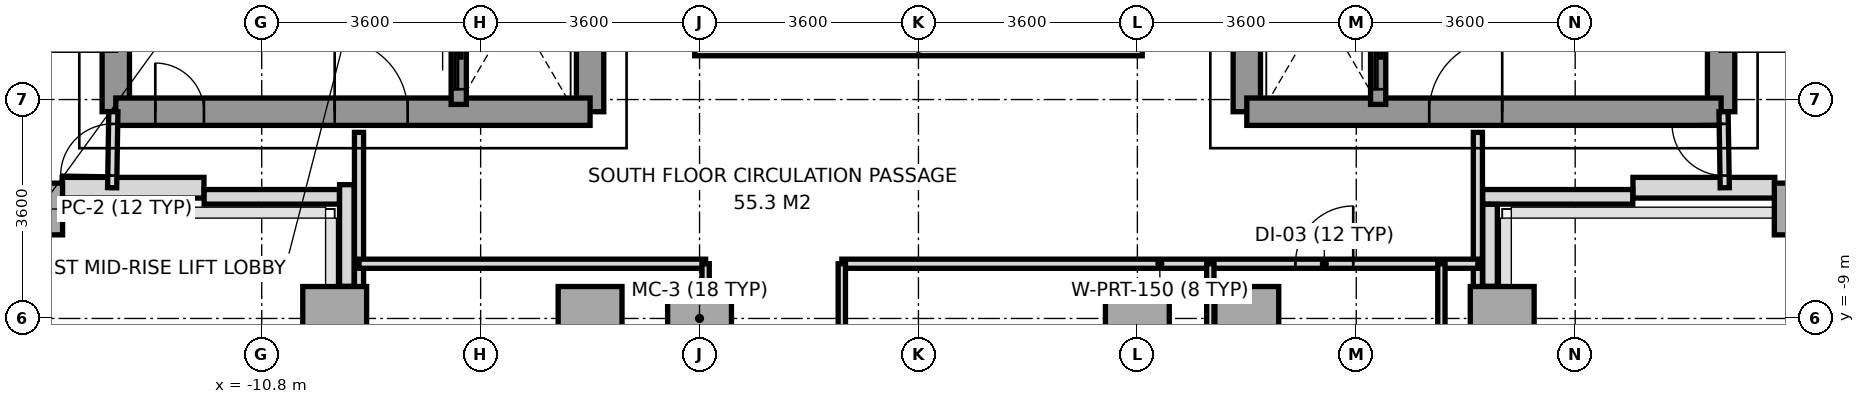
"""IFC4 building model, lengths in metres.
Left out: names, types, materials, properties, quantities, classifications, styles, units other than length and angle.
Written with IfcOpenShell. Run it as: python <this file> out.ifc"""

import sys

from ifc_helpers import new_model, si_unit, direction, frame, frame_2d, origin, origin_2d, place, context, subcontext, project, spatial, rectangle, extrude, source, transform, mapped, element, fill, save


model = new_model("IFC4")
c1 = context("Model", 3, precision=1e-05, world=origin(), true_north=direction((0.0, 1.0)))
c2 = subcontext(c1, "Body", "Model", "MODEL_VIEW")
j1 = project(units=[si_unit("LENGTHUNIT", "METRE"), si_unit("PLANEANGLEUNIT", "RADIAN")], contexts=[c1])
p1 = place(None, origin())
s1 = spatial("IfcSite", under=j1, at=p1, CompositionType="ELEMENT")
p2 = place(p1, origin())
s2 = spatial("IfcBuilding", under=s1, at=p2, CompositionType="ELEMENT")
p3 = place(p2, frame((0.0, 0.0, 107.4)))
s3 = spatial("IfcBuildingStorey", under=s2, at=p3, CompositionType="ELEMENT", Elevation=107.4)
m1 = source(origin(), c2, "Body", "SweptSolid", [
    extrude(rectangle(XDim=0.65, YDim=0.85, at=origin_2d()), origin(), (0.0, 0.0, 1.0), 3.2),
])
p4 = place(p3, frame((-14.4, -7.2, 0.0), z_axis=(0.0, 0.0, 1.0), x_axis=(1.0, 0.0, 0.0)))
e1 = element("IfcColumn", 1, at=p4, inside=s3, PredefinedType="COLUMN", context=c2, shape_type="MappedRepresentation", body=[
    mapped(m1, transform((0.0, 0.0, 0.0), x_axis=(1.0, 0.0, 0.0), y_axis=(0.0, 1.0, 0.0), z_axis=(0.0, 0.0, 1.0), scale=1.0)),
])
m2 = source(origin(), c2, "Body", "SweptSolid", [
    extrude(rectangle(XDim=1.05, YDim=1.05, at=origin_2d()), origin(), (0.0, 0.0, 1.0), 3.2),
])
for number, where, z_axis, x_axis in (
    (2, (-9.6, -9.0, 0.0), (0.0, 0.0, 1.0), (1.0, 0.0, 0.0)),
    (3, (-5.4, -9.0, 0.0), (0.0, 0.0, 1.0), (1.0, 0.0, 0.0)),
    (4, (-3.6, -9.0, 0.0), (0.0, 0.0, 1.0), (1.0, 0.0, 0.0)),
    (5, (3.6, -9.0, 0.0), (0.0, 0.0, 1.0), (1.0, 0.0, 0.0)),
    (6, (5.4, -9.0, 0.0), (0.0, 0.0, 1.0), (1.0, 0.0, 0.0)),
    (7, (9.6, -9.0, 0.0), (0.0, 0.0, 1.0), (1.0, 0.0, 0.0)),
):
    element("IfcColumn", number, at=place(p3, frame(where, z_axis=z_axis, x_axis=x_axis)), inside=s3, PredefinedType="COLUMN", context=c2, shape_type="MappedRepresentation", body=[
        mapped(m2, transform((0.0, 0.0, 0.0), x_axis=(1.0, 0.0, 0.0), y_axis=(0.0, 1.0, 0.0), z_axis=(0.0, 0.0, 1.0), scale=1.0)),
    ])
p5 = place(p3, frame((14.4, -7.2, 0.0), z_axis=(0.0, 0.0, 1.0), x_axis=(1.0, 0.0, 0.0)))
e8 = element("IfcColumn", 8, at=p5, inside=s3, PredefinedType="COLUMN", context=c2, shape_type="MappedRepresentation", body=[
    mapped(m1, transform((0.0, 0.0, 0.0), x_axis=(1.0, 0.0, 0.0), y_axis=(0.0, 1.0, 0.0), z_axis=(0.0, 0.0, 1.0), scale=1.0)),
])
for number, where, z_axis, x_axis in (
    (9, (-14.083, -6.85, 0.0), (0.0, 0.0, 1.0), (1.0, 0.0, 0.0)),
    (10, (11.75, -6.85, 0.0), (0.0, 0.0, 1.0), (1.0, 0.0, 0.0)),
):
    element("IfcWall", number, at=place(p3, frame(where, z_axis=z_axis, x_axis=x_axis)), inside=s3, PredefinedType="SOLIDWALL", context=c2, shape_type="SweptSolid", body=[
        extrude(rectangle(XDim=2.333, YDim=0.34, at=frame_2d((1.167, 0.0))), origin(), (0.0, 0.0, 1.0), 3.2),
    ])
p6 = place(p3, frame((11.747, -7.0, 0.0), z_axis=(0.0, 0.0, 1.0), x_axis=(-1.0, 0.0, 0.0)))
e11 = element("IfcWall", 11, at=p6, inside=s3, PredefinedType="PARAPET", context=c2, shape_type="SweptSolid", body=[
    extrude(rectangle(XDim=2.469, YDim=0.24, at=frame_2d((1.234, 0.0))), origin(), (0.0, 0.0, 1.0), 1.15),
])
p7 = place(p3, frame((9.4, -7.123, 0.0), z_axis=(0.0, 0.0, 1.0), x_axis=(0.0, -1.0, 0.0)))
e12 = element("IfcWall", 12, at=p7, inside=s3, PredefinedType="PARAPET", context=c2, shape_type="SweptSolid", body=[
    extrude(rectangle(XDim=1.349, YDim=0.24, at=frame_2d((0.674, 0.0))), origin(), (0.0, 0.0, 1.0), 1.15),
])
p8 = place(p3, frame((-9.4, -8.472, 0.0), z_axis=(0.0, 0.0, 1.0), x_axis=(0.0, 1.0, 0.0)))
e13 = element("IfcWall", 13, at=p8, inside=s3, PredefinedType="PARAPET", context=c2, shape_type="SweptSolid", body=[
    extrude(rectangle(XDim=1.672, YDim=0.24, at=frame_2d((0.836, 0.0))), origin(), (0.0, 0.0, 1.0), 1.15),
])
p9 = place(p3, frame((-9.523, -7.0, 0.0), z_axis=(0.0, 0.0, 1.0), x_axis=(-1.0, 0.0, 0.0)))
e14 = element("IfcWall", 14, at=p9, inside=s3, PredefinedType="PARAPET", context=c2, shape_type="SweptSolid", body=[
    extrude(rectangle(XDim=2.224, YDim=0.24, at=frame_2d((1.112, 0.0))), origin(), (0.0, 0.0, 1.0), 1.15),
])
p10 = place(p3, frame((-13.2, -5.6, 0.0), z_axis=(0.0, 0.0, 1.0), x_axis=(0.0, 1.0, 0.0)))
e15 = element("IfcWall", 15, at=p10, inside=s3, PredefinedType="SHEAR", context=c2, shape_type="SweptSolid", body=[
    extrude(rectangle(XDim=11.2, YDim=0.45, at=frame_2d((5.6, 0.0))), origin(), (0.0, 0.0, 1.0), 3.2),
])
p11 = place(p3, frame((-5.4, -5.6, 0.0), z_axis=(0.0, 0.0, 1.0), x_axis=(0.0, 1.0, 0.0)))
e16 = element("IfcWall", 16, at=p11, inside=s3, PredefinedType="SHEAR", context=c2, shape_type="SweptSolid", body=[
    extrude(rectangle(XDim=12.5, YDim=0.45, at=frame_2d((6.25, 0.0))), origin(), (0.0, 0.0, 1.0), 3.2),
])
p12 = place(p11, frame((4.55, 0.0, 0.0)))
e17 = element("IfcOpeningElement", 17, at=p12, cuts=e16, PredefinedType="OPENING", context=c2, shape_type="SweptSolid", body=[
    extrude(rectangle(XDim=1.2, YDim=2.2, at=frame_2d((0.6, 1.1))), frame((0.0, 0.235, 0.0), z_axis=(0.0, -1.0, 0.0), x_axis=(1.0, 0.0, 0.0)), (0.0, 0.0, 1.0), 0.47),
])
p13 = place(p11, frame((6.86, 0.0, 0.0)))
e18 = element("IfcOpeningElement", 18, at=p13, cuts=e16, PredefinedType="OPENING", context=c2, shape_type="SweptSolid", body=[
    extrude(rectangle(XDim=0.8, YDim=2.1, at=frame_2d((0.4, 1.05))), frame((0.0, 0.235, 0.0), z_axis=(0.0, -1.0, 0.0), x_axis=(1.0, 0.0, 0.0)), (0.0, 0.0, 1.0), 0.47),
])
p14 = place(p3, frame((-13.2, -5.6, 0.0), z_axis=(0.0, 0.0, 1.0), x_axis=(1.0, 0.0, 0.0)))
e19 = element("IfcWall", 19, at=p14, inside=s3, PredefinedType="SHEAR", context=c2, shape_type="SweptSolid", body=[
    extrude(rectangle(XDim=7.8, YDim=0.45, at=frame_2d((3.9, 0.0))), origin(), (0.0, 0.0, 1.0), 3.2),
])
p15 = place(p14, frame((3.6, 0.0, 0.0)))
e20 = element("IfcOpeningElement", 20, at=p15, cuts=e19, PredefinedType="OPENING", context=c2, shape_type="SweptSolid", body=[
    extrude(rectangle(XDim=1.2, YDim=2.2, at=frame_2d((0.6, 1.1))), frame((0.0, 0.235, 0.0), z_axis=(0.0, -1.0, 0.0), x_axis=(1.0, 0.0, 0.0)), (0.0, 0.0, 1.0), 0.47),
])
p16 = place(p14, frame((0.65, 0.0, 0.0)))
e21 = element("IfcOpeningElement", 21, at=p16, cuts=e19, PredefinedType="OPENING", context=c2, shape_type="SweptSolid", body=[
    extrude(rectangle(XDim=0.8, YDim=2.1, at=frame_2d((0.4, 1.05))), frame((0.0, 0.235, 0.0), z_axis=(0.0, -1.0, 0.0), x_axis=(1.0, 0.0, 0.0)), (0.0, 0.0, 1.0), 0.47),
])
p17 = place(p3, frame((13.2, -5.6, 0.0), z_axis=(0.0, 0.0, 1.0), x_axis=(0.0, 1.0, 0.0)))
e22 = element("IfcWall", 22, at=p17, inside=s3, PredefinedType="SHEAR", context=c2, shape_type="SweptSolid", body=[
    extrude(rectangle(XDim=11.2, YDim=0.45, at=frame_2d((5.6, 0.0))), origin(), (0.0, 0.0, 1.0), 3.2),
])
p18 = place(p3, frame((5.4, -5.6, 0.0), z_axis=(0.0, 0.0, 1.0), x_axis=(0.0, 1.0, 0.0)))
e23 = element("IfcWall", 23, at=p18, inside=s3, PredefinedType="SHEAR", context=c2, shape_type="SweptSolid", body=[
    extrude(rectangle(XDim=12.5, YDim=0.45, at=frame_2d((6.25, 0.0))), origin(), (0.0, 0.0, 1.0), 3.2),
])
p19 = place(p18, frame((4.55, 0.0, 0.0)))
e24 = element("IfcOpeningElement", 24, at=p19, cuts=e23, PredefinedType="OPENING", context=c2, shape_type="SweptSolid", body=[
    extrude(rectangle(XDim=1.2, YDim=2.2, at=frame_2d((0.6, 1.1))), frame((0.0, 0.235, 0.0), z_axis=(0.0, -1.0, 0.0), x_axis=(1.0, 0.0, 0.0)), (0.0, 0.0, 1.0), 0.47),
])
p20 = place(p18, frame((6.86, 0.0, 0.0)))
e25 = element("IfcOpeningElement", 25, at=p20, cuts=e23, PredefinedType="OPENING", context=c2, shape_type="SweptSolid", body=[
    extrude(rectangle(XDim=0.8, YDim=2.1, at=frame_2d((0.4, 1.05))), frame((0.0, 0.235, 0.0), z_axis=(0.0, -1.0, 0.0), x_axis=(1.0, 0.0, 0.0)), (0.0, 0.0, 1.0), 0.47),
])
p21 = place(p3, frame((5.4, -5.6, 0.0), z_axis=(0.0, 0.0, 1.0), x_axis=(1.0, 0.0, 0.0)))
e26 = element("IfcWall", 26, at=p21, inside=s3, PredefinedType="SHEAR", context=c2, shape_type="SweptSolid", body=[
    extrude(rectangle(XDim=7.8, YDim=0.45, at=frame_2d((3.9, 0.0))), origin(), (0.0, 0.0, 1.0), 3.2),
])
p22 = place(p21, frame((3.0, 0.0, 0.0)))
e27 = element("IfcOpeningElement", 27, at=p22, cuts=e26, PredefinedType="OPENING", context=c2, shape_type="SweptSolid", body=[
    extrude(rectangle(XDim=1.2, YDim=2.2, at=frame_2d((0.6, 1.1))), frame((0.0, 0.235, 0.0), z_axis=(0.0, -1.0, 0.0), x_axis=(1.0, 0.0, 0.0)), (0.0, 0.0, 1.0), 0.47),
])
p23 = place(p3, frame((-7.56, -5.48, 0.0), z_axis=(0.0, 0.0, 1.0), x_axis=(0.0, 1.0, 0.0)))
e28 = element("IfcWall", 28, at=p23, inside=s3, PredefinedType="SOLIDWALL", context=c2, shape_type="SweptSolid", body=[
    extrude(rectangle(XDim=1.6, YDim=0.25, at=frame_2d((0.8, 0.0))), origin(), (0.0, 0.0, 1.0), 3.2),
])
p24 = place(p23, frame((0.25, 0.0, 0.0)))
e29 = element("IfcOpeningElement", 29, at=p24, cuts=e28, PredefinedType="OPENING", context=c2, shape_type="SweptSolid", body=[
    extrude(rectangle(XDim=1.1, YDim=2.2, at=frame_2d((0.55, 1.1))), frame((0.0, 0.135, 0.0), z_axis=(0.0, -1.0, 0.0), x_axis=(1.0, 0.0, 0.0)), (0.0, 0.0, 1.0), 0.27),
])
p25 = place(p3, frame((7.56, -5.48, 0.0), z_axis=(0.0, 0.0, 1.0), x_axis=(0.0, 1.0, 0.0)))
e30 = element("IfcWall", 30, at=p25, inside=s3, PredefinedType="SOLIDWALL", context=c2, shape_type="SweptSolid", body=[
    extrude(rectangle(XDim=1.6, YDim=0.25, at=frame_2d((0.8, 0.0))), origin(), (0.0, 0.0, 1.0), 3.2),
])
p26 = place(p25, frame((0.25, 0.0, 0.0)))
e31 = element("IfcOpeningElement", 31, at=p26, cuts=e30, PredefinedType="OPENING", context=c2, shape_type="SweptSolid", body=[
    extrude(rectangle(XDim=1.1, YDim=2.2, at=frame_2d((0.55, 1.1))), frame((0.0, 0.135, 0.0), z_axis=(0.0, -1.0, 0.0), x_axis=(1.0, 0.0, 0.0)), (0.0, 0.0, 1.0), 0.27),
])
for number, where, z_axis, x_axis in (
    (32, (-9.2, -15.68, 0.0), (0.0, 0.0, 1.0), (0.0, 1.0, 0.0)),
    (33, (9.2, -15.68, 0.0), (0.0, 0.0, 1.0), (0.0, 1.0, 0.0)),
):
    element("IfcWall", number, at=place(p3, frame(where, z_axis=z_axis, x_axis=x_axis)), inside=s3, PredefinedType="PARTITIONING", context=c2, shape_type="SweptSolid", body=[
        extrude(rectangle(XDim=9.74, YDim=0.15, at=frame_2d((4.87, 0.0))), origin(), (0.0, 0.0, 1.0), 2.7),
    ])
p27 = place(p3, frame((-9.2, -8.1, 0.0), z_axis=(0.0, 0.0, 1.0), x_axis=(1.0, 0.0, 0.0)))
e34 = element("IfcWall", 34, at=p27, inside=s3, PredefinedType="PARTITIONING", context=c2, shape_type="SweptSolid", body=[
    extrude(rectangle(XDim=5.7, YDim=0.15, at=frame_2d((2.85, 0.0))), origin(), (0.0, 0.0, 1.0), 2.75),
])
p28 = place(p3, frame((-1.26, -8.1, 0.0), z_axis=(0.0, 0.0, 1.0), x_axis=(1.0, 0.0, 0.0)))
e35 = element("IfcWall", 35, at=p28, inside=s3, PredefinedType="PARTITIONING", context=c2, shape_type="SweptSolid", body=[
    extrude(rectangle(XDim=10.46, YDim=0.15, at=frame_2d((5.23, 0.0))), origin(), (0.0, 0.0, 1.0), 2.75),
])
p29 = place(p28, frame((7.46, 0.0, 0.0)))
e36 = element("IfcOpeningElement", 36, at=p29, cuts=e35, PredefinedType="OPENING", context=c2, shape_type="SweptSolid", body=[
    extrude(rectangle(XDim=0.95, YDim=2.15, at=frame_2d((0.475, 1.075))), frame((0.0, 0.085, 0.0), z_axis=(0.0, -1.0, 0.0), x_axis=(1.0, 0.0, 0.0)), (0.0, 0.0, 1.0), 0.17),
])
p30 = place(p3, frame((-3.5, -18.1, 0.0), z_axis=(0.0, 0.0, 1.0), x_axis=(0.0, 1.0, 0.0)))
e37 = element("IfcWall", 37, at=p30, inside=s3, PredefinedType="PARTITIONING", context=c2, shape_type="SweptSolid", body=[
    extrude(rectangle(XDim=10.0, YDim=0.12, at=frame_2d((5.0, 0.0))), origin(), (0.0, 0.0, 1.0), 2.7),
])
p31 = place(p30, frame((5.9, 0.0, 0.0)))
e38 = element("IfcOpeningElement", 38, at=p31, cuts=e37, PredefinedType="OPENING", context=c2, shape_type="SweptSolid", body=[
    extrude(rectangle(XDim=0.95, YDim=2.15, at=frame_2d((0.475, 1.075))), frame((0.0, 0.07, 0.0), z_axis=(0.0, -1.0, 0.0), x_axis=(1.0, 0.0, 0.0)), (0.0, 0.0, 1.0), 0.14),
])
p32 = place(p30, frame((1.2, 0.0, 0.0)))
e39 = element("IfcOpeningElement", 39, at=p32, cuts=e37, PredefinedType="OPENING", context=c2, shape_type="SweptSolid", body=[
    extrude(rectangle(XDim=0.95, YDim=2.15, at=frame_2d((0.475, 1.075))), frame((0.0, 0.07, 0.0), z_axis=(0.0, -1.0, 0.0), x_axis=(1.0, 0.0, 0.0)), (0.0, 0.0, 1.0), 0.14),
])
p33 = place(p3, frame((-1.26, -18.1, 0.0), z_axis=(0.0, 0.0, 1.0), x_axis=(0.0, 1.0, 0.0)))
e40 = element("IfcWall", 40, at=p33, inside=s3, PredefinedType="PARTITIONING", context=c2, shape_type="SweptSolid", body=[
    extrude(rectangle(XDim=10.0, YDim=0.12, at=frame_2d((5.0, 0.0))), origin(), (0.0, 0.0, 1.0), 2.7),
])
p34 = place(p33, frame((1.6, 0.0, 0.0)))
e41 = element("IfcOpeningElement", 41, at=p34, cuts=e40, PredefinedType="OPENING", context=c2, shape_type="SweptSolid", body=[
    extrude(rectangle(XDim=1.1, YDim=2.2, at=frame_2d((0.55, 1.1))), frame((0.0, 0.07, 0.0), z_axis=(0.0, -1.0, 0.0), x_axis=(1.0, 0.0, 0.0)), (0.0, 0.0, 1.0), 0.14),
])
p35 = place(p3, frame((4.8, -11.5, 0.0), z_axis=(0.0, 0.0, 1.0), x_axis=(0.0, 1.0, 0.0)))
e42 = element("IfcWall", 42, at=p35, inside=s3, PredefinedType="PARTITIONING", context=c2, shape_type="SweptSolid", body=[
    extrude(rectangle(XDim=3.4, YDim=0.12, at=frame_2d((1.7, 0.0))), origin(), (0.0, 0.0, 1.0), 3.2),
])
p36 = place(p3, frame((8.6, -11.5, 0.0), z_axis=(0.0, 0.0, 1.0), x_axis=(0.0, 1.0, 0.0)))
e43 = element("IfcWall", 43, at=p36, inside=s3, PredefinedType="PARTITIONING", context=c2, shape_type="SweptSolid", body=[
    extrude(rectangle(XDim=3.4, YDim=0.12, at=frame_2d((1.7, 0.0))), origin(), (0.0, 0.0, 1.0), 2.7),
])
p37 = place(p3, frame((-13.26, -6.85, 0.0), z_axis=(0.0, 0.0, 1.0), x_axis=(0.016013571389, 0.999871774545, 0.0)))
e44 = element("IfcWall", 44, at=p37, inside=s3, PredefinedType="PARTITIONING", context=c2, shape_type="SweptSolid", body=[
    extrude(rectangle(XDim=1.25, YDim=0.15, at=frame_2d((0.625, 0.0))), origin(), (0.0, 0.0, 1.0), 3.2),
])
p38 = place(p37, frame((0.2, 0.0, 0.0)))
e45 = element("IfcOpeningElement", 45, at=p38, cuts=e44, PredefinedType="OPENING", context=c2, shape_type="SweptSolid", body=[
    extrude(rectangle(XDim=0.85, YDim=2.1, at=frame_2d((0.425, 1.05))), frame((0.0, 0.085, 0.0), z_axis=(0.0, -1.0, 0.0), x_axis=(1.0, 0.0, 0.0)), (0.0, 0.0, 1.0), 0.17),
])
p39 = place(p3, frame((13.26, -6.85, 0.0), z_axis=(0.0, 0.0, 1.0), x_axis=(-0.016013571389, 0.999871774545, 0.0)))
e46 = element("IfcWall", 46, at=p39, inside=s3, PredefinedType="PARTITIONING", context=c2, shape_type="SweptSolid", body=[
    extrude(rectangle(XDim=1.25, YDim=0.15, at=frame_2d((0.625, 0.0))), origin(), (0.0, 0.0, 1.0), 3.2),
])
p40 = place(p39, frame((0.2, 0.0, 0.0)))
e47 = element("IfcOpeningElement", 47, at=p40, cuts=e46, PredefinedType="OPENING", context=c2, shape_type="SweptSolid", body=[
    extrude(rectangle(XDim=0.85, YDim=2.1, at=frame_2d((0.425, 1.05))), frame((0.0, 0.085, 0.0), z_axis=(0.0, -1.0, 0.0), x_axis=(1.0, 0.0, 0.0)), (0.0, 0.0, 1.0), 0.17),
])
p41 = place(p3, frame((-3.68, -4.56, 0.0), z_axis=(0.0, 0.0, 1.0), x_axis=(1.0, 0.0, 0.0)))
e48 = element("IfcWall", 48, at=p41, inside=s3, PredefinedType="PARAPET", context=c2, shape_type="SweptSolid", body=[
    extrude(rectangle(XDim=7.36, YDim=0.24, at=frame_2d((3.68, 0.0))), origin(), (0.0, 0.0, 1.0), 1.15),
])
m3 = source(origin(), c2, "Body", "SweptSolid", [
    extrude(rectangle(XDim=1.2, YDim=2.2, at=frame_2d((0.6, 1.1))), frame((0.0, 0.025, 0.0), z_axis=(0.0, -1.0, 0.0), x_axis=(1.0, 0.0, 0.0)), (0.0, 0.0, 1.0), 0.05),
])
p42 = place(p15, origin())
e49 = element("IfcDoor", 49, at=p42, inside=s3, OperationType="SINGLE_SWING_LEFT", PredefinedType="DOOR", context=c2, shape_type="MappedRepresentation", body=[
    mapped(m3, transform((0.0, 0.0, 0.0), x_axis=(1.0, 0.0, 0.0), y_axis=(0.0, 1.0, 0.0), z_axis=(0.0, 0.0, 1.0), scale=1.0)),
])
fill(e20, e49)
p43 = place(p22, origin())
e50 = element("IfcDoor", 50, at=p43, inside=s3, OperationType="SINGLE_SWING_RIGHT", PredefinedType="DOOR", context=c2, shape_type="MappedRepresentation", body=[
    mapped(m3, transform((0.0, 0.0, 0.0), x_axis=(1.0, 0.0, 0.0), y_axis=(0.0, 1.0, 0.0), z_axis=(0.0, 0.0, 1.0), scale=1.0)),
])
fill(e27, e50)
m4 = source(origin(), c2, "Body", "SweptSolid", [
    extrude(rectangle(XDim=0.8, YDim=2.1, at=frame_2d((0.4, 1.05))), frame((0.0, 0.025, 0.0), z_axis=(0.0, -1.0, 0.0), x_axis=(1.0, 0.0, 0.0)), (0.0, 0.0, 1.0), 0.05),
])
p44 = place(p16, origin())
e51 = element("IfcDoor", 51, at=p44, inside=s3, OperationType="SINGLE_SWING_LEFT", PredefinedType="DOOR", context=c2, shape_type="MappedRepresentation", body=[
    mapped(m4, transform((0.0, 0.0, 0.0), x_axis=(1.0, 0.0, 0.0), y_axis=(0.0, 1.0, 0.0), z_axis=(0.0, 0.0, 1.0), scale=1.0)),
])
fill(e21, e51)
m5 = source(origin(), c2, "Body", "SweptSolid", [
    extrude(rectangle(XDim=1.1, YDim=2.2, at=frame_2d((0.55, 1.1))), frame((0.0, 0.025, 0.0), z_axis=(0.0, -1.0, 0.0), x_axis=(1.0, 0.0, 0.0)), (0.0, 0.0, 1.0), 0.05),
])
p45 = place(p24, origin())
e52 = element("IfcDoor", 52, at=p45, inside=s3, OperationType="SLIDING_TO_LEFT", PredefinedType="DOOR", context=c2, shape_type="MappedRepresentation", body=[
    mapped(m5, transform((0.0, 0.0, 0.0), x_axis=(1.0, 0.0, 0.0), y_axis=(0.0, 1.0, 0.0), z_axis=(0.0, 0.0, 1.0), scale=1.0)),
])
fill(e29, e52)
p46 = place(p26, origin())
e53 = element("IfcDoor", 53, at=p46, inside=s3, OperationType="SLIDING_TO_LEFT", PredefinedType="DOOR", context=c2, shape_type="MappedRepresentation", body=[
    mapped(m5, transform((0.0, 0.0, 0.0), x_axis=(1.0, 0.0, 0.0), y_axis=(0.0, 1.0, 0.0), z_axis=(0.0, 0.0, 1.0), scale=1.0)),
])
fill(e31, e53)
m6 = source(origin(), c2, "Body", "SweptSolid", [
    extrude(rectangle(XDim=0.95, YDim=2.15, at=frame_2d((0.475, 1.075))), frame((0.0, 0.025, 0.0), z_axis=(0.0, -1.0, 0.0), x_axis=(1.0, 0.0, 0.0)), (0.0, 0.0, 1.0), 0.05),
])
p47 = place(p29, origin())
e54 = element("IfcDoor", 54, at=p47, inside=s3, OperationType="SINGLE_SWING_RIGHT", PredefinedType="DOOR", context=c2, shape_type="MappedRepresentation", body=[
    mapped(m6, transform((0.0, 0.0, 0.0), x_axis=(1.0, 0.0, 0.0), y_axis=(0.0, 1.0, 0.0), z_axis=(0.0, 0.0, 1.0), scale=1.0)),
])
fill(e36, e54)
m7 = source(origin(), c2, "Body", "SweptSolid", [
    extrude(rectangle(XDim=0.85, YDim=2.1, at=frame_2d((0.425, 1.05))), frame((0.0, 0.025, 0.0), z_axis=(0.0, -1.0, 0.0), x_axis=(1.0, 0.0, 0.0)), (0.0, 0.0, 1.0), 0.05),
])
p48 = place(p38, origin())
e55 = element("IfcDoor", 55, at=p48, inside=s3, OperationType="SINGLE_SWING_LEFT", PredefinedType="DOOR", context=c2, shape_type="MappedRepresentation", body=[
    mapped(m7, transform((0.0, 0.0, 0.0), x_axis=(1.0, 0.0, 0.0), y_axis=(0.0, 1.0, 0.0), z_axis=(0.0, 0.0, 1.0), scale=1.0)),
])
fill(e45, e55)
p49 = place(p40, origin())
e56 = element("IfcDoor", 56, at=p49, inside=s3, OperationType="SINGLE_SWING_RIGHT", PredefinedType="DOOR", context=c2, shape_type="MappedRepresentation", body=[
    mapped(m7, transform((0.0, 0.0, 0.0), x_axis=(1.0, 0.0, 0.0), y_axis=(0.0, 1.0, 0.0), z_axis=(0.0, 0.0, 1.0), scale=1.0)),
])
fill(e47, e56)
save(model, sys.argv[1])
